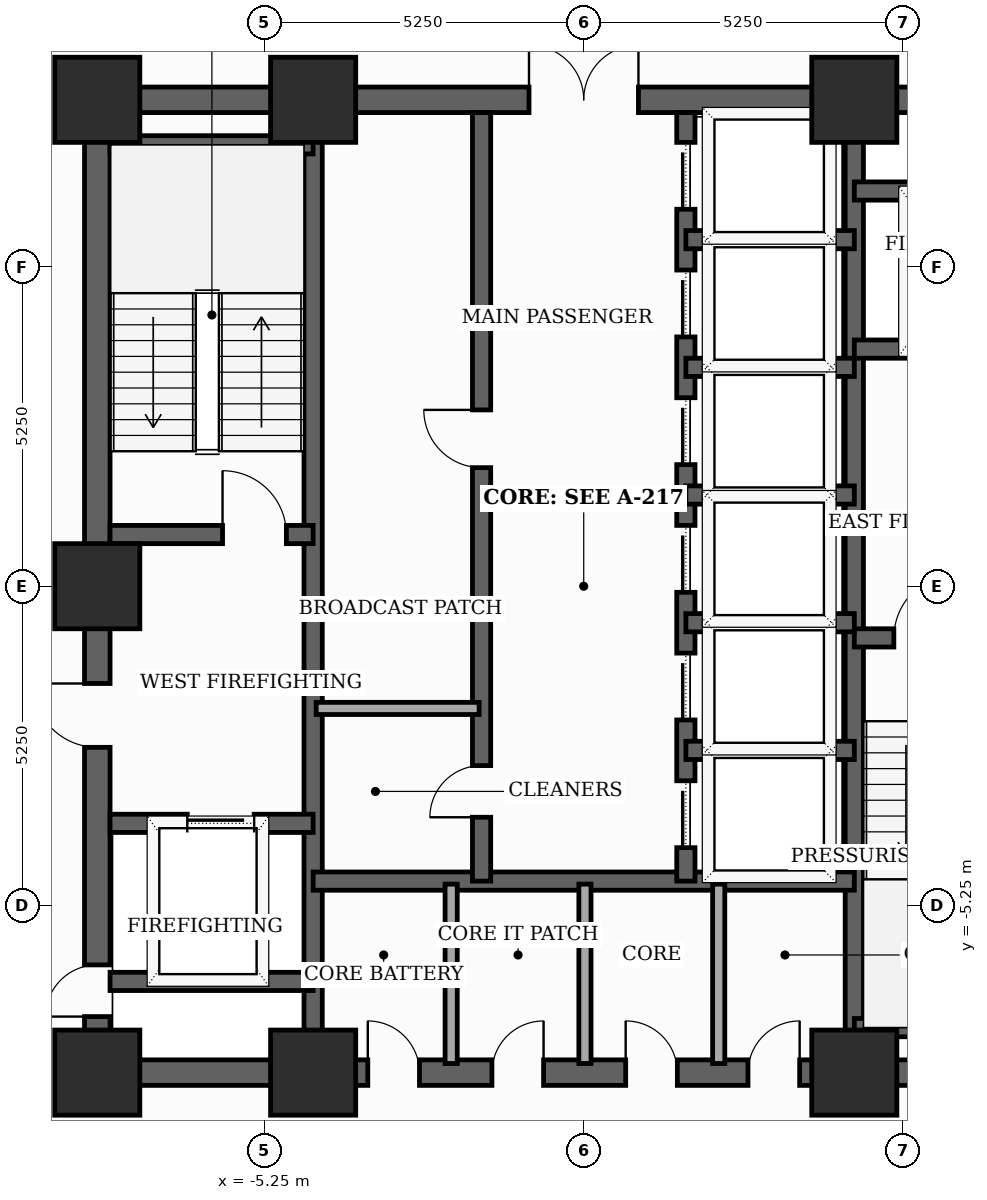
"""IFC4 building model, lengths in metres.
Left out: names, types, materials, properties, quantities, classifications, styles, units other than length and angle.
Written with IfcOpenShell. Run it as: python <this file> out.ifc"""

import sys

from ifc_helpers import new_model, si_unit, direction, frame, frame_2d, origin, origin_2d, place, context, subcontext, project, spatial, rectangle, extrude, element, fill, save


model = new_model("IFC4")
c1 = context("Model", 3, precision=1e-05, world=origin(), true_north=direction((0.0, 1.0)))
c2 = subcontext(c1, "Body", "Model", "MODEL_VIEW")
j1 = project(units=[si_unit("LENGTHUNIT", "METRE"), si_unit("PLANEANGLEUNIT", "RADIAN")], contexts=[c1])
p1 = place(None, origin())
s1 = spatial("IfcSite", under=j1, at=p1, CompositionType="ELEMENT")
p2 = place(p1, origin())
s2 = spatial("IfcBuilding", under=s1, at=p2, CompositionType="ELEMENT")
p3 = place(p2, frame((0.0, 0.0, 142.1)))
s3 = spatial("IfcBuildingStorey", under=s2, at=p3, CompositionType="ELEMENT", Elevation=142.1)
for number, where, z_axis, x_axis in (
    (1, (-8.0, -8.0, 0.0), (0.0, 0.0, 1.0), (1.0, 0.0, 0.0)),
    (2, (-4.45, -8.0, 0.0), (0.0, 0.0, 1.0), (1.0, 0.0, 0.0)),
    (3, (4.45, -8.0, 0.0), (0.0, 0.0, 1.0), (1.0, 0.0, 0.0)),
    (4, (4.45, 8.0, 0.0), (0.0, 0.0, 1.0), (1.0, 0.0, 0.0)),
    (5, (-4.45, 8.0, 0.0), (0.0, 0.0, 1.0), (1.0, 0.0, 0.0)),
    (6, (-8.0, 8.0, 0.0), (0.0, 0.0, 1.0), (1.0, 0.0, 0.0)),
    (7, (-8.0, 0.0, 0.0), (0.0, 0.0, 1.0), (1.0, 0.0, 0.0)),
):
    element("IfcColumn", number, at=place(p3, frame(where, z_axis=z_axis, x_axis=x_axis)), inside=s3, PredefinedType="COLUMN", context=c2, shape_type="SweptSolid", body=[
        extrude(rectangle(XDim=1.4, YDim=1.4, at=origin_2d()), origin(), (0.0, 0.0, 1.0), 3.7),
    ])
p4 = place(p3, frame((-8.0, -8.0, 0.0), z_axis=(0.0, 0.0, 1.0), x_axis=(0.0, 1.0, 0.0)))
e8 = element("IfcWall", 8, at=p4, inside=s3, PredefinedType="SHEAR", context=c2, shape_type="SweptSolid", body=[
    extrude(rectangle(XDim=16.0, YDim=0.42, at=frame_2d((8.0, 0.0))), origin(), (0.0, 0.0, 1.0), 3.5),
])
p5 = place(p4, frame((0.922, 0.0, 0.0)))
e9 = element("IfcOpeningElement", 9, at=p5, cuts=e8, PredefinedType="OPENING", context=c2, shape_type="SweptSolid", body=[
    extrude(rectangle(XDim=0.85, YDim=2.02, at=frame_2d((0.425, 1.01))), frame((0.0, 0.22, 0.0), z_axis=(0.0, -1.0, 0.0), x_axis=(1.0, 0.0, 0.0)), (0.0, 0.0, 1.0), 0.44),
])
p6 = place(p4, frame((5.35, 0.0, 0.0)))
e10 = element("IfcOpeningElement", 10, at=p6, cuts=e8, PredefinedType="OPENING", context=c2, shape_type="SweptSolid", body=[
    extrude(rectangle(XDim=1.05, YDim=2.15, at=frame_2d((0.525, 1.075))), frame((0.0, 0.22, 0.0), z_axis=(0.0, -1.0, 0.0), x_axis=(1.0, 0.0, 0.0)), (0.0, 0.0, 1.0), 0.44),
])
p7 = place(p3, frame((-8.0, -8.0, 0.0), z_axis=(0.0, 0.0, 1.0), x_axis=(1.0, 0.0, 0.0)))
e11 = element("IfcWall", 11, at=p7, inside=s3, PredefinedType="SHEAR", context=c2, shape_type="SweptSolid", body=[
    extrude(rectangle(XDim=16.0, YDim=0.42, at=frame_2d((8.0, 0.0))), origin(), (0.0, 0.0, 1.0), 3.5),
])
p8 = place(p7, frame((4.449, 0.0, 0.0)))
e12 = element("IfcOpeningElement", 12, at=p8, cuts=e11, PredefinedType="OPENING", context=c2, shape_type="SweptSolid", body=[
    extrude(rectangle(XDim=0.85, YDim=2.02, at=frame_2d((0.425, 1.01))), frame((0.0, 0.22, 0.0), z_axis=(0.0, -1.0, 0.0), x_axis=(1.0, 0.0, 0.0)), (0.0, 0.0, 1.0), 0.44),
])
p9 = place(p7, frame((6.49, 0.0, 0.0)))
e13 = element("IfcOpeningElement", 13, at=p9, cuts=e11, PredefinedType="OPENING", context=c2, shape_type="SweptSolid", body=[
    extrude(rectangle(XDim=0.85, YDim=2.02, at=frame_2d((0.425, 1.01))), frame((0.0, 0.22, 0.0), z_axis=(0.0, -1.0, 0.0), x_axis=(1.0, 0.0, 0.0)), (0.0, 0.0, 1.0), 0.44),
])
p10 = place(p7, frame((8.69, 0.0, 0.0)))
e14 = element("IfcOpeningElement", 14, at=p10, cuts=e11, PredefinedType="OPENING", context=c2, shape_type="SweptSolid", body=[
    extrude(rectangle(XDim=0.85, YDim=2.02, at=frame_2d((0.425, 1.01))), frame((0.0, 0.22, 0.0), z_axis=(0.0, -1.0, 0.0), x_axis=(1.0, 0.0, 0.0)), (0.0, 0.0, 1.0), 0.44),
])
p11 = place(p7, frame((10.701, 0.0, 0.0)))
e15 = element("IfcOpeningElement", 15, at=p11, cuts=e11, PredefinedType="OPENING", context=c2, shape_type="SweptSolid", body=[
    extrude(rectangle(XDim=0.85, YDim=2.02, at=frame_2d((0.425, 1.01))), frame((0.0, 0.22, 0.0), z_axis=(0.0, -1.0, 0.0), x_axis=(1.0, 0.0, 0.0)), (0.0, 0.0, 1.0), 0.44),
])
p12 = place(p3, frame((-8.0, 8.0, 0.0), z_axis=(0.0, 0.0, 1.0), x_axis=(1.0, 0.0, 0.0)))
e16 = element("IfcWall", 16, at=p12, inside=s3, PredefinedType="SHEAR", context=c2, shape_type="SweptSolid", body=[
    extrude(rectangle(XDim=16.0, YDim=0.42, at=frame_2d((8.0, 0.0))), origin(), (0.0, 0.0, 1.0), 3.5),
])
p13 = place(p12, frame((7.1, 0.0, 0.0)))
e17 = element("IfcOpeningElement", 17, at=p13, cuts=e16, PredefinedType="OPENING", context=c2, shape_type="SweptSolid", body=[
    extrude(rectangle(XDim=1.8, YDim=2.15, at=frame_2d((0.9, 1.075))), frame((0.0, 0.22, 0.0), z_axis=(0.0, -1.0, 0.0), x_axis=(1.0, 0.0, 0.0)), (0.0, 0.0, 1.0), 0.44),
])
for number, where, z_axis, x_axis in (
    (18, (-4.45, -7.79, 0.0), (0.0, 0.0, 1.0), (0.0, 1.0, 0.0)),
    (19, (4.45, -7.79, 0.0), (0.0, 0.0, 1.0), (0.0, 1.0, 0.0)),
):
    element("IfcWall", number, at=place(p3, frame(where, z_axis=z_axis, x_axis=x_axis)), inside=s3, PredefinedType="SHEAR", context=c2, shape_type="SweptSolid", body=[
        extrude(rectangle(XDim=15.58, YDim=0.3, at=frame_2d((7.79, 0.0))), origin(), (0.0, 0.0, 1.0), 3.5),
    ])
p14 = place(p3, frame((-7.79, 0.85, 0.0), z_axis=(0.0, 0.0, 1.0), x_axis=(1.0, 0.0, 0.0)))
e20 = element("IfcWall", 20, at=p14, inside=s3, PredefinedType="SHEAR", context=c2, shape_type="SweptSolid", body=[
    extrude(rectangle(XDim=3.34, YDim=0.3, at=frame_2d((1.67, 0.0))), origin(), (0.0, 0.0, 1.0), 3.5),
])
p15 = place(p14, frame((1.85, 0.0, 0.0)))
e21 = element("IfcOpeningElement", 21, at=p15, cuts=e20, PredefinedType="OPENING", context=c2, shape_type="SweptSolid", body=[
    extrude(rectangle(XDim=1.05, YDim=2.15, at=frame_2d((0.525, 1.075))), frame((0.0, 0.16, 0.0), z_axis=(0.0, -1.0, 0.0), x_axis=(1.0, 0.0, 0.0)), (0.0, 0.0, 1.0), 0.32),
])
p16 = place(p3, frame((-7.79, 7.26, 0.0), z_axis=(0.0, 0.0, 1.0), x_axis=(1.0, 0.0, 0.0)))
e22 = element("IfcWall", 22, at=p16, inside=s3, PredefinedType="SHEAR", context=c2, shape_type="SweptSolid", body=[
    extrude(rectangle(XDim=3.34, YDim=0.3, at=frame_2d((1.67, 0.0))), origin(), (0.0, 0.0, 1.0), 3.5),
])
p17 = place(p3, frame((4.45, -0.85, 0.0), z_axis=(0.0, 0.0, 1.0), x_axis=(1.0, 0.0, 0.0)))
e23 = element("IfcWall", 23, at=p17, inside=s3, PredefinedType="SHEAR", context=c2, shape_type="SweptSolid", body=[
    extrude(rectangle(XDim=3.34, YDim=0.3, at=frame_2d((1.67, 0.0))), origin(), (0.0, 0.0, 1.0), 3.5),
])
p18 = place(p17, frame((0.65, 0.0, 0.0)))
e24 = element("IfcOpeningElement", 24, at=p18, cuts=e23, PredefinedType="OPENING", context=c2, shape_type="SweptSolid", body=[
    extrude(rectangle(XDim=1.05, YDim=2.15, at=frame_2d((0.525, 1.075))), frame((0.0, 0.16, 0.0), z_axis=(0.0, -1.0, 0.0), x_axis=(1.0, 0.0, 0.0)), (0.0, 0.0, 1.0), 0.32),
])
p19 = place(p3, frame((4.45, -7.26, 0.0), z_axis=(0.0, 0.0, 1.0), x_axis=(1.0, 0.0, 0.0)))
e25 = element("IfcWall", 25, at=p19, inside=s3, PredefinedType="SHEAR", context=c2, shape_type="SweptSolid", body=[
    extrude(rectangle(XDim=3.55, YDim=0.3, at=frame_2d((1.775, 0.0))), origin(), (0.0, 0.0, 1.0), 3.5),
])
p20 = place(p3, frame((-7.79, -3.9, 0.0), z_axis=(0.0, 0.0, 1.0), x_axis=(1.0, 0.0, 0.0)))
e26 = element("IfcWall", 26, at=p20, inside=s3, PredefinedType="SHEAR", context=c2, shape_type="SweptSolid", body=[
    extrude(rectangle(XDim=3.34, YDim=0.3, at=frame_2d((1.67, 0.0))), origin(), (0.0, 0.0, 1.0), 3.5),
])
p21 = place(p20, frame((1.27, 0.0, 0.0)))
e27 = element("IfcOpeningElement", 27, at=p21, cuts=e26, PredefinedType="OPENING", context=c2, shape_type="SweptSolid", body=[
    extrude(rectangle(XDim=1.1, YDim=2.1, at=frame_2d((0.55, 1.05))), frame((0.0, 0.16, 0.0), z_axis=(0.0, -1.0, 0.0), x_axis=(1.0, 0.0, 0.0)), (0.0, 0.0, 1.0), 0.32),
])
p22 = place(p3, frame((-7.79, -6.5, 0.0), z_axis=(0.0, 0.0, 1.0), x_axis=(1.0, 0.0, 0.0)))
e28 = element("IfcWall", 28, at=p22, inside=s3, PredefinedType="SHEAR", context=c2, shape_type="SweptSolid", body=[
    extrude(rectangle(XDim=3.34, YDim=0.3, at=frame_2d((1.67, 0.0))), origin(), (0.0, 0.0, 1.0), 3.5),
])
p23 = place(p3, frame((4.45, 3.9, 0.0), z_axis=(0.0, 0.0, 1.0), x_axis=(1.0, 0.0, 0.0)))
e29 = element("IfcWall", 29, at=p23, inside=s3, PredefinedType="SHEAR", context=c2, shape_type="SweptSolid", body=[
    extrude(rectangle(XDim=3.34, YDim=0.3, at=frame_2d((1.67, 0.0))), origin(), (0.0, 0.0, 1.0), 3.5),
])
p24 = place(p23, frame((1.18, 0.0, 0.0)))
e30 = element("IfcOpeningElement", 30, at=p24, cuts=e29, PredefinedType="OPENING", context=c2, shape_type="SweptSolid", body=[
    extrude(rectangle(XDim=1.1, YDim=2.1, at=frame_2d((0.55, 1.05))), frame((0.0, 0.16, 0.0), z_axis=(0.0, -1.0, 0.0), x_axis=(1.0, 0.0, 0.0)), (0.0, 0.0, 1.0), 0.32),
])
p25 = place(p3, frame((4.45, 6.5, 0.0), z_axis=(0.0, 0.0, 1.0), x_axis=(1.0, 0.0, 0.0)))
e31 = element("IfcWall", 31, at=p25, inside=s3, PredefinedType="SHEAR", context=c2, shape_type="SweptSolid", body=[
    extrude(rectangle(XDim=3.34, YDim=0.3, at=frame_2d((1.67, 0.0))), origin(), (0.0, 0.0, 1.0), 3.5),
])
p26 = place(p3, frame((-4.45, -4.85, 0.0), z_axis=(0.0, 0.0, 1.0), x_axis=(1.0, 0.0, 0.0)))
e32 = element("IfcWall", 32, at=p26, inside=s3, PredefinedType="SHEAR", context=c2, shape_type="SweptSolid", body=[
    extrude(rectangle(XDim=8.9, YDim=0.3, at=frame_2d((4.45, 0.0))), origin(), (0.0, 0.0, 1.0), 3.5),
])
p27 = place(p3, frame((-1.68, -4.85, 0.0), z_axis=(0.0, 0.0, 1.0), x_axis=(0.0, 1.0, 0.0)))
e33 = element("IfcWall", 33, at=p27, inside=s3, PredefinedType="SHEAR", context=c2, shape_type="SweptSolid", body=[
    extrude(rectangle(XDim=12.64, YDim=0.3, at=frame_2d((6.32, 0.0))), origin(), (0.0, 0.0, 1.0), 3.5),
])
p28 = place(p27, frame((1.05, 0.0, 0.0)))
e34 = element("IfcOpeningElement", 34, at=p28, cuts=e33, PredefinedType="OPENING", context=c2, shape_type="SweptSolid", body=[
    extrude(rectangle(XDim=0.85, YDim=2.02, at=frame_2d((0.425, 1.01))), frame((0.0, 0.16, 0.0), z_axis=(0.0, -1.0, 0.0), x_axis=(1.0, 0.0, 0.0)), (0.0, 0.0, 1.0), 0.32),
])
p29 = place(p27, frame((6.8, 0.0, 0.0)))
e35 = element("IfcOpeningElement", 35, at=p29, cuts=e33, PredefinedType="OPENING", context=c2, shape_type="SweptSolid", body=[
    extrude(rectangle(XDim=0.95, YDim=2.1, at=frame_2d((0.475, 1.05))), frame((0.0, 0.16, 0.0), z_axis=(0.0, -1.0, 0.0), x_axis=(1.0, 0.0, 0.0)), (0.0, 0.0, 1.0), 0.32),
])
p30 = place(p3, frame((1.68, -4.85, 0.0), z_axis=(0.0, 0.0, 1.0), x_axis=(0.0, 1.0, 0.0)))
e36 = element("IfcWall", 36, at=p30, inside=s3, PredefinedType="SHEAR", context=c2, shape_type="SweptSolid", body=[
    extrude(rectangle(XDim=12.64, YDim=0.3, at=frame_2d((6.32, 0.0))), origin(), (0.0, 0.0, 1.0), 3.5),
])
p31 = place(p30, frame((0.55, 0.0, 0.0)))
e37 = element("IfcOpeningElement", 37, at=p31, cuts=e36, PredefinedType="OPENING", context=c2, shape_type="SweptSolid", body=[
    extrude(rectangle(XDim=1.1, YDim=2.1, at=frame_2d((0.55, 1.05))), frame((0.0, 0.16, 0.0), z_axis=(0.0, -1.0, 0.0), x_axis=(1.0, 0.0, 0.0)), (0.0, 0.0, 1.0), 0.32),
])
p32 = place(p30, frame((2.65, 0.0, 0.0)))
e38 = element("IfcOpeningElement", 38, at=p32, cuts=e36, PredefinedType="OPENING", context=c2, shape_type="SweptSolid", body=[
    extrude(rectangle(XDim=1.1, YDim=2.1, at=frame_2d((0.55, 1.05))), frame((0.0, 0.16, 0.0), z_axis=(0.0, -1.0, 0.0), x_axis=(1.0, 0.0, 0.0)), (0.0, 0.0, 1.0), 0.32),
])
p33 = place(p30, frame((4.75, 0.0, 0.0)))
e39 = element("IfcOpeningElement", 39, at=p33, cuts=e36, PredefinedType="OPENING", context=c2, shape_type="SweptSolid", body=[
    extrude(rectangle(XDim=1.1, YDim=2.1, at=frame_2d((0.55, 1.05))), frame((0.0, 0.16, 0.0), z_axis=(0.0, -1.0, 0.0), x_axis=(1.0, 0.0, 0.0)), (0.0, 0.0, 1.0), 0.32),
])
p34 = place(p30, frame((6.85, 0.0, 0.0)))
e40 = element("IfcOpeningElement", 40, at=p34, cuts=e36, PredefinedType="OPENING", context=c2, shape_type="SweptSolid", body=[
    extrude(rectangle(XDim=1.1, YDim=2.1, at=frame_2d((0.55, 1.05))), frame((0.0, 0.16, 0.0), z_axis=(0.0, -1.0, 0.0), x_axis=(1.0, 0.0, 0.0)), (0.0, 0.0, 1.0), 0.32),
])
p35 = place(p30, frame((8.95, 0.0, 0.0)))
e41 = element("IfcOpeningElement", 41, at=p35, cuts=e36, PredefinedType="OPENING", context=c2, shape_type="SweptSolid", body=[
    extrude(rectangle(XDim=1.1, YDim=2.1, at=frame_2d((0.55, 1.05))), frame((0.0, 0.16, 0.0), z_axis=(0.0, -1.0, 0.0), x_axis=(1.0, 0.0, 0.0)), (0.0, 0.0, 1.0), 0.32),
])
p36 = place(p30, frame((11.05, 0.0, 0.0)))
e42 = element("IfcOpeningElement", 42, at=p36, cuts=e36, PredefinedType="OPENING", context=c2, shape_type="SweptSolid", body=[
    extrude(rectangle(XDim=1.1, YDim=2.1, at=frame_2d((0.55, 1.05))), frame((0.0, 0.16, 0.0), z_axis=(0.0, -1.0, 0.0), x_axis=(1.0, 0.0, 0.0)), (0.0, 0.0, 1.0), 0.32),
])
for number, where, z_axis, x_axis in (
    (43, (1.68, 1.5, 0.0), (0.0, 0.0, 1.0), (1.0, 0.0, 0.0)),
    (44, (1.68, 3.6, 0.0), (0.0, 0.0, 1.0), (1.0, 0.0, 0.0)),
    (45, (1.68, 5.7, 0.0), (0.0, 0.0, 1.0), (1.0, 0.0, 0.0)),
    (46, (1.68, -2.7, 0.0), (0.0, 0.0, 1.0), (1.0, 0.0, 0.0)),
    (47, (1.68, -0.6, 0.0), (0.0, 0.0, 1.0), (1.0, 0.0, 0.0)),
):
    element("IfcWall", number, at=place(p3, frame(where, z_axis=z_axis, x_axis=x_axis)), inside=s3, PredefinedType="SHEAR", context=c2, shape_type="SweptSolid", body=[
        extrude(rectangle(XDim=2.77, YDim=0.3, at=frame_2d((1.385, 0.0))), origin(), (0.0, 0.0, 1.0), 3.5),
    ])
for number, where, z_axis, x_axis in (
    (48, (-2.18, -7.85, 0.0), (0.0, 0.0, 1.0), (0.0, 1.0, 0.0)),
    (49, (0.02, -7.85, 0.0), (0.0, 0.0, 1.0), (0.0, 1.0, 0.0)),
    (50, (2.22, -7.85, 0.0), (0.0, 0.0, 1.0), (0.0, 1.0, 0.0)),
):
    element("IfcWall", number, at=place(p3, frame(where, z_axis=z_axis, x_axis=x_axis)), inside=s3, PredefinedType="SOLIDWALL", context=c2, shape_type="SweptSolid", body=[
        extrude(rectangle(XDim=2.95, YDim=0.2, at=frame_2d((1.475, 0.0))), origin(), (0.0, 0.0, 1.0), 2.885),
    ])
p37 = place(p3, frame((-4.4, -2.01, 0.0), z_axis=(0.0, 0.0, 1.0), x_axis=(1.0, 0.0, 0.0)))
e51 = element("IfcWall", 51, at=p37, inside=s3, PredefinedType="SOLIDWALL", context=c2, shape_type="SweptSolid", body=[
    extrude(rectangle(XDim=2.68, YDim=0.2, at=frame_2d((1.34, 0.0))), origin(), (0.0, 0.0, 1.0), 3.5),
])
p38 = place(p5, origin())
e52 = element("IfcDoor", 52, at=p38, inside=s3, OperationType="SINGLE_SWING_LEFT", PredefinedType="TRAPDOOR", context=c2, shape_type="SweptSolid", body=[
    extrude(rectangle(XDim=0.85, YDim=2.02, at=frame_2d((0.425, 1.01))), frame((0.0, 0.025, 0.0), z_axis=(0.0, -1.0, 0.0), x_axis=(1.0, 0.0, 0.0)), (0.0, 0.0, 1.0), 0.05),
])
fill(e9, e52)
p39 = place(p6, origin())
e53 = element("IfcDoor", 53, at=p39, inside=s3, OperationType="SINGLE_SWING_RIGHT", PredefinedType="DOOR", context=c2, shape_type="SweptSolid", body=[
    extrude(rectangle(XDim=1.05, YDim=2.15, at=frame_2d((0.525, 1.075))), frame((0.0, 0.025, 0.0), z_axis=(0.0, -1.0, 0.0), x_axis=(1.0, 0.0, 0.0)), (0.0, 0.0, 1.0), 0.05),
])
fill(e10, e53)
p40 = place(p8, origin())
e54 = element("IfcDoor", 54, at=p40, inside=s3, OperationType="SINGLE_SWING_LEFT", PredefinedType="TRAPDOOR", context=c2, shape_type="SweptSolid", body=[
    extrude(rectangle(XDim=0.85, YDim=2.02, at=frame_2d((0.425, 1.01))), frame((0.0, 0.025, 0.0), z_axis=(0.0, -1.0, 0.0), x_axis=(1.0, 0.0, 0.0)), (0.0, 0.0, 1.0), 0.05),
])
fill(e12, e54)
p41 = place(p9, origin())
e55 = element("IfcDoor", 55, at=p41, inside=s3, OperationType="SINGLE_SWING_RIGHT", PredefinedType="TRAPDOOR", context=c2, shape_type="SweptSolid", body=[
    extrude(rectangle(XDim=0.85, YDim=2.02, at=frame_2d((0.425, 1.01))), frame((0.0, 0.025, 0.0), z_axis=(0.0, -1.0, 0.0), x_axis=(1.0, 0.0, 0.0)), (0.0, 0.0, 1.0), 0.05),
])
fill(e13, e55)
p42 = place(p10, origin())
e56 = element("IfcDoor", 56, at=p42, inside=s3, OperationType="SINGLE_SWING_LEFT", PredefinedType="TRAPDOOR", context=c2, shape_type="SweptSolid", body=[
    extrude(rectangle(XDim=0.85, YDim=2.02, at=frame_2d((0.425, 1.01))), frame((0.0, 0.025, 0.0), z_axis=(0.0, -1.0, 0.0), x_axis=(1.0, 0.0, 0.0)), (0.0, 0.0, 1.0), 0.05),
])
fill(e14, e56)
p43 = place(p11, origin())
e57 = element("IfcDoor", 57, at=p43, inside=s3, OperationType="SINGLE_SWING_RIGHT", PredefinedType="TRAPDOOR", context=c2, shape_type="SweptSolid", body=[
    extrude(rectangle(XDim=0.85, YDim=2.02, at=frame_2d((0.425, 1.01))), frame((0.0, 0.025, 0.0), z_axis=(0.0, -1.0, 0.0), x_axis=(1.0, 0.0, 0.0)), (0.0, 0.0, 1.0), 0.05),
])
fill(e15, e57)
p44 = place(p13, origin())
e58 = element("IfcDoor", 58, at=p44, inside=s3, OperationType="DOUBLE_DOOR_SINGLE_SWING", PredefinedType="DOOR", context=c2, shape_type="SweptSolid", body=[
    extrude(rectangle(XDim=1.8, YDim=2.15, at=frame_2d((0.9, 1.075))), frame((0.0, 0.025, 0.0), z_axis=(0.0, -1.0, 0.0), x_axis=(1.0, 0.0, 0.0)), (0.0, 0.0, 1.0), 0.05),
])
fill(e17, e58)
p45 = place(p15, origin())
e59 = element("IfcDoor", 59, at=p45, inside=s3, OperationType="SINGLE_SWING_LEFT", PredefinedType="DOOR", context=c2, shape_type="SweptSolid", body=[
    extrude(rectangle(XDim=1.05, YDim=2.15, at=frame_2d((0.525, 1.075))), frame((0.0, 0.025, 0.0), z_axis=(0.0, -1.0, 0.0), x_axis=(1.0, 0.0, 0.0)), (0.0, 0.0, 1.0), 0.05),
])
fill(e21, e59)
p46 = place(p18, origin())
e60 = element("IfcDoor", 60, at=p46, inside=s3, OperationType="SINGLE_SWING_RIGHT", PredefinedType="DOOR", context=c2, shape_type="SweptSolid", body=[
    extrude(rectangle(XDim=1.05, YDim=2.15, at=frame_2d((0.525, 1.075))), frame((0.0, 0.025, 0.0), z_axis=(0.0, -1.0, 0.0), x_axis=(1.0, 0.0, 0.0)), (0.0, 0.0, 1.0), 0.05),
])
fill(e24, e60)
p47 = place(p21, origin())
e61 = element("IfcDoor", 61, at=p47, inside=s3, OperationType="SLIDING_TO_LEFT", PredefinedType="DOOR", context=c2, shape_type="SweptSolid", body=[
    extrude(rectangle(XDim=1.1, YDim=2.1, at=frame_2d((0.55, 1.05))), frame((0.0, 0.025, 0.0), z_axis=(0.0, -1.0, 0.0), x_axis=(1.0, 0.0, 0.0)), (0.0, 0.0, 1.0), 0.05),
])
fill(e27, e61)
p48 = place(p28, origin())
e62 = element("IfcDoor", 62, at=p48, inside=s3, OperationType="SINGLE_SWING_LEFT", PredefinedType="TRAPDOOR", context=c2, shape_type="SweptSolid", body=[
    extrude(rectangle(XDim=0.85, YDim=2.02, at=frame_2d((0.425, 1.01))), frame((0.0, 0.025, 0.0), z_axis=(0.0, -1.0, 0.0), x_axis=(1.0, 0.0, 0.0)), (0.0, 0.0, 1.0), 0.05),
])
fill(e34, e62)
p49 = place(p29, origin())
e63 = element("IfcDoor", 63, at=p49, inside=s3, OperationType="SINGLE_SWING_RIGHT", PredefinedType="DOOR", context=c2, shape_type="SweptSolid", body=[
    extrude(rectangle(XDim=0.95, YDim=2.1, at=frame_2d((0.475, 1.05))), frame((0.0, 0.025, 0.0), z_axis=(0.0, -1.0, 0.0), x_axis=(1.0, 0.0, 0.0)), (0.0, 0.0, 1.0), 0.05),
])
fill(e35, e63)
p50 = place(p31, origin())
e64 = element("IfcDoor", 64, at=p50, inside=s3, OperationType="SLIDING_TO_LEFT", PredefinedType="DOOR", context=c2, shape_type="SweptSolid", body=[
    extrude(rectangle(XDim=1.1, YDim=2.1, at=frame_2d((0.55, 1.05))), frame((0.0, 0.025, 0.0), z_axis=(0.0, -1.0, 0.0), x_axis=(1.0, 0.0, 0.0)), (0.0, 0.0, 1.0), 0.05),
])
fill(e37, e64)
p51 = place(p32, origin())
e65 = element("IfcDoor", 65, at=p51, inside=s3, OperationType="SLIDING_TO_LEFT", PredefinedType="DOOR", context=c2, shape_type="SweptSolid", body=[
    extrude(rectangle(XDim=1.1, YDim=2.1, at=frame_2d((0.55, 1.05))), frame((0.0, 0.025, 0.0), z_axis=(0.0, -1.0, 0.0), x_axis=(1.0, 0.0, 0.0)), (0.0, 0.0, 1.0), 0.05),
])
fill(e38, e65)
p52 = place(p33, origin())
e66 = element("IfcDoor", 66, at=p52, inside=s3, OperationType="SLIDING_TO_LEFT", PredefinedType="DOOR", context=c2, shape_type="SweptSolid", body=[
    extrude(rectangle(XDim=1.1, YDim=2.1, at=frame_2d((0.55, 1.05))), frame((0.0, 0.025, 0.0), z_axis=(0.0, -1.0, 0.0), x_axis=(1.0, 0.0, 0.0)), (0.0, 0.0, 1.0), 0.05),
])
fill(e39, e66)
p53 = place(p34, origin())
e67 = element("IfcDoor", 67, at=p53, inside=s3, OperationType="SLIDING_TO_LEFT", PredefinedType="DOOR", context=c2, shape_type="SweptSolid", body=[
    extrude(rectangle(XDim=1.1, YDim=2.1, at=frame_2d((0.55, 1.05))), frame((0.0, 0.025, 0.0), z_axis=(0.0, -1.0, 0.0), x_axis=(1.0, 0.0, 0.0)), (0.0, 0.0, 1.0), 0.05),
])
fill(e40, e67)
p54 = place(p35, origin())
e68 = element("IfcDoor", 68, at=p54, inside=s3, OperationType="SLIDING_TO_LEFT", PredefinedType="DOOR", context=c2, shape_type="SweptSolid", body=[
    extrude(rectangle(XDim=1.1, YDim=2.1, at=frame_2d((0.55, 1.05))), frame((0.0, 0.025, 0.0), z_axis=(0.0, -1.0, 0.0), x_axis=(1.0, 0.0, 0.0)), (0.0, 0.0, 1.0), 0.05),
])
fill(e41, e68)
p55 = place(p36, origin())
e69 = element("IfcDoor", 69, at=p55, inside=s3, OperationType="SLIDING_TO_LEFT", PredefinedType="DOOR", context=c2, shape_type="SweptSolid", body=[
    extrude(rectangle(XDim=1.1, YDim=2.1, at=frame_2d((0.55, 1.05))), frame((0.0, 0.025, 0.0), z_axis=(0.0, -1.0, 0.0), x_axis=(1.0, 0.0, 0.0)), (0.0, 0.0, 1.0), 0.05),
])
fill(e42, e69)
save(model, sys.argv[1])
